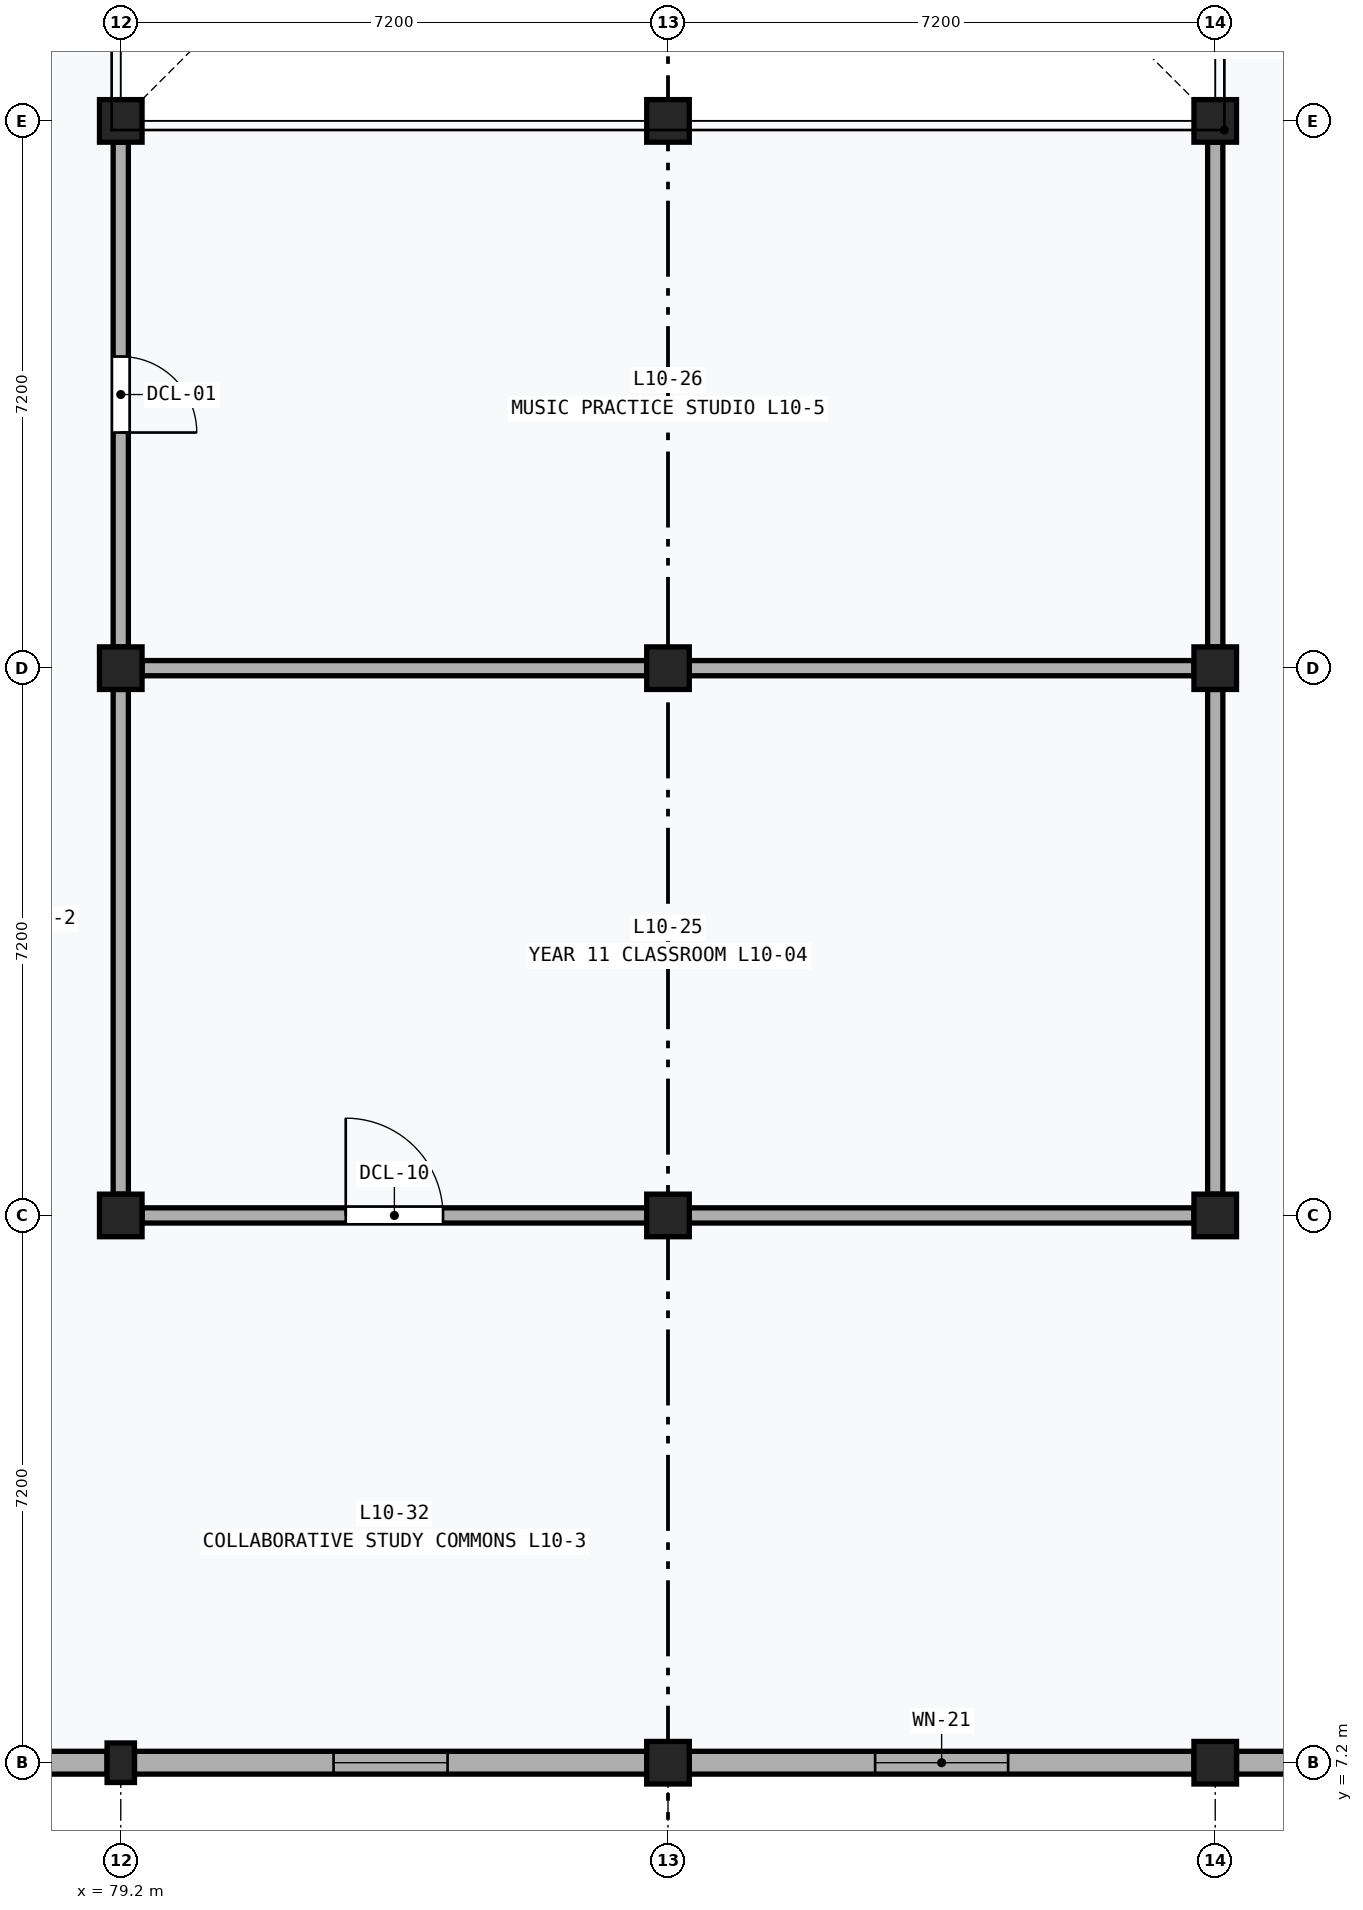
"""IFC4 building model, lengths in metres.
Left out: names, types, materials, properties, quantities, classifications, styles, units other than length and angle.
Written with IfcOpenShell. Run it as: python <this file> out.ifc"""

import sys

from ifc_helpers import new_model, si_unit, direction, frame, frame_2d, origin, origin_2d, place, context, subcontext, project, spatial, rectangle, extrude, element, fill, save


model = new_model("IFC4")
c1 = context("Model", 3, precision=1e-05, world=origin(), true_north=direction((0.0, 1.0)))
c2 = subcontext(c1, "Body", "Model", "MODEL_VIEW")
j1 = project(units=[si_unit("LENGTHUNIT", "METRE"), si_unit("PLANEANGLEUNIT", "RADIAN")], contexts=[c1])
p1 = place(None, origin())
s1 = spatial("IfcSite", under=j1, at=p1, CompositionType="ELEMENT")
p2 = place(p1, origin())
s2 = spatial("IfcBuilding", under=s1, at=p2, CompositionType="ELEMENT")
p3 = place(p2, frame((0.0, 0.0, 42.8)))
s3 = spatial("IfcBuildingStorey", under=s2, at=p3, CompositionType="ELEMENT", Elevation=42.8)
p4 = place(p3, frame((79.2, 7.2, 0.0), z_axis=(0.0, 0.0, 1.0), x_axis=(1.0, 0.0, 0.0)))
e1 = element("IfcColumn", 1, at=p4, inside=s3, PredefinedType="PILASTER", context=c2, shape_type="SweptSolid", body=[
    extrude(rectangle(XDim=0.36, YDim=0.52, at=origin_2d()), origin(), (0.0, 0.0, 1.0), 4.0),
])
for number, where, z_axis, x_axis in (
    (2, (79.2, 14.4, 0.0), (0.0, 0.0, 1.0), (1.0, 0.0, 0.0)),
    (3, (79.2, 21.6, 0.0), (0.0, 0.0, 1.0), (1.0, 0.0, 0.0)),
    (4, (79.2, 28.8, 0.0), (0.0, 0.0, 1.0), (1.0, 0.0, 0.0)),
    (5, (86.4, 7.2, 0.0), (0.0, 0.0, 1.0), (1.0, 0.0, 0.0)),
    (6, (86.4, 14.4, 0.0), (0.0, 0.0, 1.0), (1.0, 0.0, 0.0)),
    (7, (86.4, 21.6, 0.0), (0.0, 0.0, 1.0), (1.0, 0.0, 0.0)),
    (8, (86.4, 28.8, 0.0), (0.0, 0.0, 1.0), (1.0, 0.0, 0.0)),
    (9, (93.6, 7.2, 0.0), (0.0, 0.0, 1.0), (1.0, 0.0, 0.0)),
    (10, (93.6, 14.4, 0.0), (0.0, 0.0, 1.0), (1.0, 0.0, 0.0)),
    (11, (93.6, 21.6, 0.0), (0.0, 0.0, 1.0), (1.0, 0.0, 0.0)),
    (12, (93.6, 28.8, 0.0), (0.0, 0.0, 1.0), (1.0, 0.0, 0.0)),
):
    element("IfcColumn", number, at=place(p3, frame(where, z_axis=z_axis, x_axis=x_axis)), inside=s3, PredefinedType="COLUMN", context=c2, shape_type="SweptSolid", body=[
        extrude(rectangle(XDim=0.56, YDim=0.56, at=origin_2d()), origin(), (0.0, 0.0, 1.0), 4.0),
    ])
p5 = place(p3, frame((72.28, 7.2, 0.0), z_axis=(0.0, 0.0, 1.0), x_axis=(1.0, 0.0, 0.0)))
e13 = element("IfcWall", 13, at=p5, inside=s3, PredefinedType="SOLIDWALL", context=c2, shape_type="SweptSolid", body=[
    extrude(rectangle(XDim=6.74, YDim=0.3, at=frame_2d((3.37, 0.0))), origin(), (0.0, 0.0, 1.0), 3.18),
])
p6 = place(p5, frame((2.12, 0.0, 1.1)))
e14 = element("IfcOpeningElement", 14, at=p6, cuts=e13, PredefinedType="OPENING", context=c2, shape_type="SweptSolid", body=[
    extrude(rectangle(XDim=2.5, YDim=1.5, at=frame_2d((1.25, 0.75))), frame((0.0, 0.162, 0.0), z_axis=(0.0, -1.0, 0.0), x_axis=(1.0, 0.0, 0.0)), (0.0, 0.0, 1.0), 0.324),
])
p7 = place(p3, frame((79.38, 7.2, 0.0), z_axis=(0.0, 0.0, 1.0), x_axis=(1.0, 0.0, 0.0)))
e15 = element("IfcWall", 15, at=p7, inside=s3, PredefinedType="SOLIDWALL", context=c2, shape_type="SweptSolid", body=[
    extrude(rectangle(XDim=6.74, YDim=0.3, at=frame_2d((3.37, 0.0))), origin(), (0.0, 0.0, 1.0), 3.18),
])
p8 = place(p7, frame((2.62, 0.0, 1.2)))
e16 = element("IfcOpeningElement", 16, at=p8, cuts=e15, PredefinedType="OPENING", context=c2, shape_type="SweptSolid", body=[
    extrude(rectangle(XDim=1.5, YDim=1.35, at=frame_2d((0.75, 0.675))), frame((0.0, 0.162, 0.0), z_axis=(0.0, -1.0, 0.0), x_axis=(1.0, 0.0, 0.0)), (0.0, 0.0, 1.0), 0.324),
])
p9 = place(p3, frame((86.68, 7.2, 0.0), z_axis=(0.0, 0.0, 1.0), x_axis=(1.0, 0.0, 0.0)))
e17 = element("IfcWall", 17, at=p9, inside=s3, PredefinedType="SOLIDWALL", context=c2, shape_type="SweptSolid", body=[
    extrude(rectangle(XDim=6.64, YDim=0.3, at=frame_2d((3.32, 0.0))), origin(), (0.0, 0.0, 1.0), 3.18),
])
p10 = place(p9, frame((2.445, 0.0, 1.2)))
e18 = element("IfcOpeningElement", 18, at=p10, cuts=e17, PredefinedType="OPENING", context=c2, shape_type="SweptSolid", body=[
    extrude(rectangle(XDim=1.75, YDim=1.35, at=frame_2d((0.875, 0.675))), frame((0.0, 0.162, 0.0), z_axis=(0.0, -1.0, 0.0), x_axis=(1.0, 0.0, 0.0)), (0.0, 0.0, 1.0), 0.324),
])
p11 = place(p3, frame((93.88, 7.2, 0.0), z_axis=(0.0, 0.0, 1.0), x_axis=(1.0, 0.0, 0.0)))
e19 = element("IfcWall", 19, at=p11, inside=s3, PredefinedType="SOLIDWALL", context=c2, shape_type="SweptSolid", body=[
    extrude(rectangle(XDim=6.64, YDim=0.3, at=frame_2d((3.32, 0.0))), origin(), (0.0, 0.0, 1.0), 3.18),
])
p12 = place(p11, frame((2.57, 0.0, 1.1)))
e20 = element("IfcOpeningElement", 20, at=p12, cuts=e19, PredefinedType="OPENING", context=c2, shape_type="SweptSolid", body=[
    extrude(rectangle(XDim=1.5, YDim=1.35, at=frame_2d((0.75, 0.675))), frame((0.0, 0.162, 0.0), z_axis=(0.0, -1.0, 0.0), x_axis=(1.0, 0.0, 0.0)), (0.0, 0.0, 1.0), 0.324),
])
p13 = place(p3, frame((79.48, 14.4, 0.0), z_axis=(0.0, 0.0, 1.0), x_axis=(1.0, 0.0, 0.0)))
e21 = element("IfcWall", 21, at=p13, inside=s3, PredefinedType="PARTITIONING", context=c2, shape_type="SweptSolid", body=[
    extrude(rectangle(XDim=6.64, YDim=0.2, at=frame_2d((3.32, 0.0))), origin(), (0.0, 0.0, 1.0), 3.02),
])
p14 = place(p13, frame((2.68, 0.0, 0.0)))
e22 = element("IfcOpeningElement", 22, at=p14, cuts=e21, PredefinedType="OPENING", context=c2, shape_type="SweptSolid", body=[
    extrude(rectangle(XDim=1.28, YDim=2.28, at=frame_2d((0.64, 1.14))), frame((0.0, 0.112, 0.0), z_axis=(0.0, -1.0, 0.0), x_axis=(1.0, 0.0, 0.0)), (0.0, 0.0, 1.0), 0.224),
])
for number, where, z_axis, x_axis in (
    (23, (79.48, 21.6, 0.0), (0.0, 0.0, 1.0), (1.0, 0.0, 0.0)),
    (24, (79.2, 14.68, 0.0), (0.0, 0.0, 1.0), (0.0, 1.0, 0.0)),
    (25, (86.68, 14.4, 0.0), (0.0, 0.0, 1.0), (1.0, 0.0, 0.0)),
    (26, (86.68, 21.6, 0.0), (0.0, 0.0, 1.0), (1.0, 0.0, 0.0)),
    (27, (93.6, 14.68, 0.0), (0.0, 0.0, 1.0), (0.0, 1.0, 0.0)),
):
    element("IfcWall", number, at=place(p3, frame(where, z_axis=z_axis, x_axis=x_axis)), inside=s3, PredefinedType="PARTITIONING", context=c2, shape_type="SweptSolid", body=[
        extrude(rectangle(XDim=6.64, YDim=0.2, at=frame_2d((3.32, 0.0))), origin(), (0.0, 0.0, 1.0), 3.02),
    ])
p15 = place(p3, frame((79.2, 21.88, 0.0), z_axis=(0.0, 0.0, 1.0), x_axis=(0.0, 1.0, 0.0)))
e28 = element("IfcWall", 28, at=p15, inside=s3, PredefinedType="PARTITIONING", context=c2, shape_type="SweptSolid", body=[
    extrude(rectangle(XDim=6.64, YDim=0.2, at=frame_2d((3.32, 0.0))), origin(), (0.0, 0.0, 1.0), 3.02),
])
p16 = place(p15, frame((2.82, 0.0, 0.0)))
e29 = element("IfcOpeningElement", 29, at=p16, cuts=e28, PredefinedType="OPENING", context=c2, shape_type="SweptSolid", body=[
    extrude(rectangle(XDim=1.0, YDim=2.1, at=frame_2d((0.5, 1.05))), frame((0.0, 0.112, 0.0), z_axis=(0.0, -1.0, 0.0), x_axis=(1.0, 0.0, 0.0)), (0.0, 0.0, 1.0), 0.224),
])
p17 = place(p3, frame((93.6, 21.88, 0.0), z_axis=(0.0, 0.0, 1.0), x_axis=(0.0, 1.0, 0.0)))
e30 = element("IfcWall", 30, at=p17, inside=s3, PredefinedType="PARTITIONING", context=c2, shape_type="SweptSolid", body=[
    extrude(rectangle(XDim=6.64, YDim=0.2, at=frame_2d((3.32, 0.0))), origin(), (0.0, 0.0, 1.0), 3.02),
])
p18 = place(p8, origin())
e31 = element("IfcWindow", 31, at=p18, inside=s3, PartitioningType="SINGLE_PANEL", PredefinedType="WINDOW", context=c2, shape_type="SweptSolid", body=[
    extrude(rectangle(XDim=1.5, YDim=1.35, at=frame_2d((0.75, 0.675))), frame((0.0, 0.03, 0.0), z_axis=(0.0, -1.0, 0.0), x_axis=(1.0, 0.0, 0.0)), (0.0, 0.0, 1.0), 0.06),
])
fill(e16, e31)
p19 = place(p10, origin())
e32 = element("IfcWindow", 32, at=p19, inside=s3, PartitioningType="SINGLE_PANEL", PredefinedType="WINDOW", context=c2, shape_type="SweptSolid", body=[
    extrude(rectangle(XDim=1.75, YDim=1.35, at=frame_2d((0.875, 0.675))), frame((0.0, 0.03, 0.0), z_axis=(0.0, -1.0, 0.0), x_axis=(1.0, 0.0, 0.0)), (0.0, 0.0, 1.0), 0.06),
])
fill(e18, e32)
p20 = place(p14, origin())
e33 = element("IfcDoor", 33, at=p20, inside=s3, OperationType="SINGLE_SWING_LEFT", PredefinedType="DOOR", context=c2, shape_type="SweptSolid", body=[
    extrude(rectangle(XDim=1.28, YDim=2.28, at=frame_2d((0.64, 1.14))), frame((0.0, 0.025, 0.0), z_axis=(0.0, -1.0, 0.0), x_axis=(1.0, 0.0, 0.0)), (0.0, 0.0, 1.0), 0.05),
])
fill(e22, e33)
p21 = place(p16, frame((1.0, 0.0, 0.0), z_axis=(0.0, 0.0, 1.0), x_axis=(-1.0, 0.0, 0.0)))
e34 = element("IfcDoor", 34, at=p21, inside=s3, OperationType="SINGLE_SWING_RIGHT", PredefinedType="DOOR", context=c2, shape_type="SweptSolid", body=[
    extrude(rectangle(XDim=1.0, YDim=2.1, at=frame_2d((0.5, 1.05))), frame((0.0, 0.025, 0.0), z_axis=(0.0, -1.0, 0.0), x_axis=(1.0, 0.0, 0.0)), (0.0, 0.0, 1.0), 0.05),
])
fill(e29, e34)
save(model, sys.argv[1])
